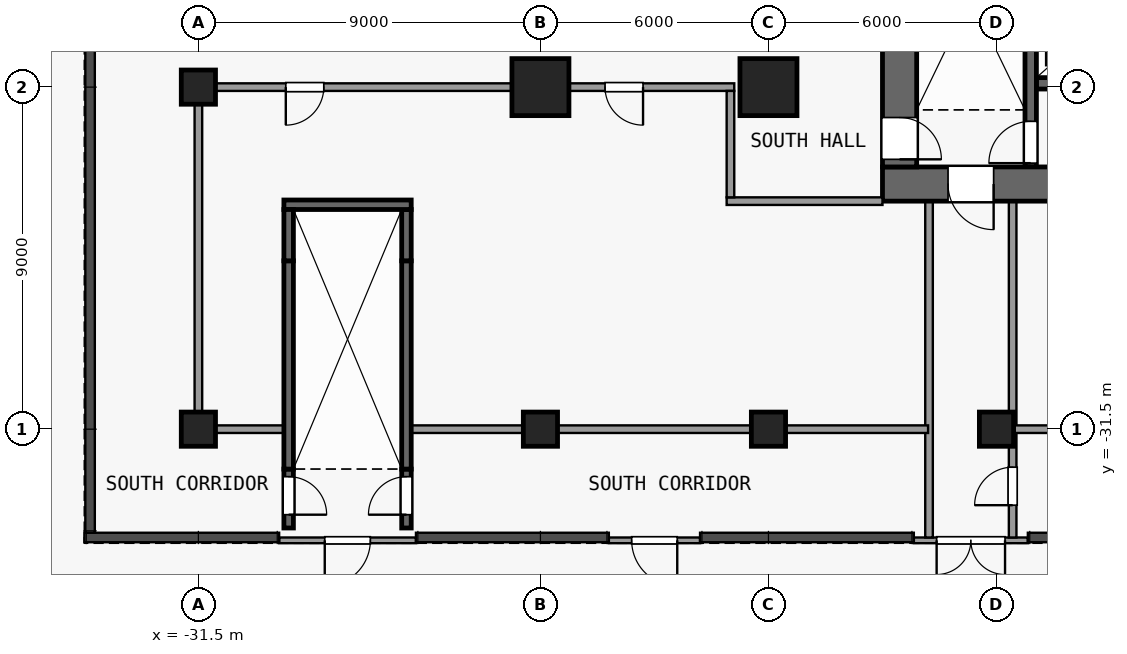
"""IFC4 building model, lengths in metres.
Left out: names, types, materials, properties, quantities, classifications, styles, units other than length and angle.
Written with IfcOpenShell. Run it as: python <this file> out.ifc"""

import sys

from ifc_helpers import new_model, si_unit, direction, frame, frame_2d, origin, origin_2d, place, context, subcontext, project, spatial, rectangle, extrude, element, fill, save


model = new_model("IFC4")
c1 = context("Model", 3, precision=1e-05, world=origin(), true_north=direction((0.0, 1.0)))
c2 = subcontext(c1, "Body", "Model", "MODEL_VIEW")
j1 = project(units=[si_unit("LENGTHUNIT", "METRE"), si_unit("PLANEANGLEUNIT", "RADIAN")], contexts=[c1])
p1 = place(None, origin())
s1 = spatial("IfcSite", under=j1, at=p1, CompositionType="ELEMENT")
p2 = place(p1, origin())
s2 = spatial("IfcBuilding", under=s1, at=p2, CompositionType="ELEMENT")
p3 = place(p2, origin())
s3 = spatial("IfcBuildingStorey", under=s2, at=p3, CompositionType="ELEMENT", Elevation=0.0)
for number, where, z_axis, x_axis in (
    (1, (-31.5, -31.5, 0.0), (0.0, 0.0, 1.0), (1.0, 0.0, 0.0)),
    (2, (-31.5, -22.5, 0.0), (0.0, 0.0, 1.0), (1.0, 0.0, 0.0)),
    (3, (-22.5, -31.5, 0.0), (0.0, 0.0, 1.0), (1.0, 0.0, 0.0)),
):
    element("IfcColumn", number, at=place(p3, frame(where, z_axis=z_axis, x_axis=x_axis)), inside=s3, PredefinedType="COLUMN", context=c2, shape_type="SweptSolid", body=[
        extrude(rectangle(XDim=0.9, YDim=0.9, at=origin_2d()), origin(), (0.0, 0.0, 1.0), 8.0),
    ])
p4 = place(p3, frame((-22.5, -22.5, 0.0), z_axis=(0.0, 0.0, 1.0), x_axis=(1.0, 0.0, 0.0)))
e4 = element("IfcColumn", 4, at=p4, inside=s3, PredefinedType="COLUMN", context=c2, shape_type="SweptSolid", body=[
    extrude(rectangle(XDim=1.5, YDim=1.5, at=origin_2d()), origin(), (0.0, 0.0, 1.0), 8.0),
])
p5 = place(p3, frame((-16.5, -31.5, 0.0), z_axis=(0.0, 0.0, 1.0), x_axis=(1.0, 0.0, 0.0)))
e5 = element("IfcColumn", 5, at=p5, inside=s3, PredefinedType="COLUMN", context=c2, shape_type="SweptSolid", body=[
    extrude(rectangle(XDim=0.9, YDim=0.9, at=origin_2d()), origin(), (0.0, 0.0, 1.0), 8.0),
])
p6 = place(p3, frame((-16.5, -22.5, 0.0), z_axis=(0.0, 0.0, 1.0), x_axis=(1.0, 0.0, 0.0)))
e6 = element("IfcColumn", 6, at=p6, inside=s3, PredefinedType="COLUMN", context=c2, shape_type="SweptSolid", body=[
    extrude(rectangle(XDim=1.5, YDim=1.5, at=origin_2d()), origin(), (0.0, 0.0, 1.0), 8.0),
])
p7 = place(p3, frame((-10.5, -31.5, 0.0), z_axis=(0.0, 0.0, 1.0), x_axis=(1.0, 0.0, 0.0)))
e7 = element("IfcColumn", 7, at=p7, inside=s3, PredefinedType="COLUMN", context=c2, shape_type="SweptSolid", body=[
    extrude(rectangle(XDim=0.9, YDim=0.9, at=origin_2d()), origin(), (0.0, 0.0, 1.0), 8.0),
])
p8 = place(p3, frame((13.5, -25.05, 0.0), z_axis=(0.0, 0.0, 1.0), x_axis=(-1.0, 0.0, 0.0)))
e8 = element("IfcWall", 8, at=p8, inside=s3, PredefinedType="SHEAR", context=c2, shape_type="SweptSolid", body=[
    extrude(rectangle(XDim=27.0, YDim=0.9, at=frame_2d((13.5, 0.0))), origin(), (0.0, 0.0, 1.0), 7.65),
])
p9 = place(p8, frame((24.075, 0.0, 0.0)))
e9 = element("IfcOpeningElement", 9, at=p9, cuts=e8, PredefinedType="OPENING", context=c2, shape_type="SweptSolid", body=[
    extrude(rectangle(XDim=1.2, YDim=2.1, at=frame_2d((0.6, 1.05))), frame((0.0, 0.46, 0.0), z_axis=(0.0, -1.0, 0.0), x_axis=(1.0, 0.0, 0.0)), (0.0, 0.0, 1.0), 0.92),
])
p10 = place(p8, frame((1.725, 0.0, 0.0)))
e10 = element("IfcOpeningElement", 10, at=p10, cuts=e8, PredefinedType="OPENING", context=c2, shape_type="SweptSolid", body=[
    extrude(rectangle(XDim=1.2, YDim=2.1, at=frame_2d((0.6, 1.05))), frame((0.0, 0.46, 0.0), z_axis=(0.0, -1.0, 0.0), x_axis=(1.0, 0.0, 0.0)), (0.0, 0.0, 1.0), 0.92),
])
p11 = place(p3, frame((-13.05, -8.5, 0.0), z_axis=(0.0, 0.0, 1.0), x_axis=(0.0, -1.0, 0.0)))
e11 = element("IfcWall", 11, at=p11, inside=s3, PredefinedType="SHEAR", context=c2, shape_type="SweptSolid", body=[
    extrude(rectangle(XDim=16.1, YDim=0.9, at=frame_2d((8.05, 0.0))), origin(), (0.0, 0.0, 1.0), 7.65),
])
p12 = place(p11, frame((14.8, 0.0, 0.0)))
e12 = element("IfcOpeningElement", 12, at=p12, cuts=e11, PredefinedType="OPENING", context=c2, shape_type="SweptSolid", body=[
    extrude(rectangle(XDim=1.1, YDim=2.1, at=frame_2d((0.55, 1.05))), frame((0.0, 0.46, 0.0), z_axis=(0.0, -1.0, 0.0), x_axis=(1.0, 0.0, 0.0)), (0.0, 0.0, 1.0), 0.92),
])
p13 = place(p3, frame((-9.45, -22.4, 0.0), z_axis=(0.0, 0.0, 1.0), x_axis=(1.0, 0.0, 0.0)))
e13 = element("IfcWall", 13, at=p13, inside=s3, PredefinedType="SHEAR", context=c2, shape_type="SweptSolid", body=[
    extrude(rectangle(XDim=2.8, YDim=0.3, at=frame_2d((1.4, 0.0))), origin(), (0.0, 0.0, 1.0), 7.65),
])
p14 = place(p3, frame((-9.6, -24.6, 0.0), z_axis=(0.0, 0.0, 1.0), x_axis=(0.0, 1.0, 0.0)))
e14 = element("IfcWall", 14, at=p14, inside=s3, PredefinedType="SHEAR", context=c2, shape_type="SweptSolid", body=[
    extrude(rectangle(XDim=7.7, YDim=0.3, at=frame_2d((3.85, 0.0))), origin(), (0.0, 0.0, 1.0), 7.65),
])
p15 = place(p14, frame((0.1, 0.0, 0.0)))
e15 = element("IfcOpeningElement", 15, at=p15, cuts=e14, PredefinedType="OPENING", context=c2, shape_type="SweptSolid", body=[
    extrude(rectangle(XDim=1.1, YDim=2.1, at=frame_2d((0.55, 1.05))), frame((0.0, 0.16, 0.0), z_axis=(0.0, -1.0, 0.0), x_axis=(1.0, 0.0, 0.0)), (0.0, 0.0, 1.0), 0.32),
])
p16 = place(p3, frame((-12.275, -25.5, 0.0), z_axis=(0.0, 0.0, 1.0), x_axis=(0.0, -1.0, 0.0)))
e16 = element("IfcWall", 16, at=p16, inside=s3, PredefinedType="PARTITIONING", context=c2, shape_type="SweptSolid", body=[
    extrude(rectangle(XDim=8.85, YDim=0.2, at=frame_2d((4.425, 0.0))), origin(), (0.0, 0.0, 1.0), 7.65),
])
p17 = place(p3, frame((-10.075, -34.35, 0.0), z_axis=(0.0, 0.0, 1.0), x_axis=(0.0, 1.0, 0.0)))
e17 = element("IfcWall", 17, at=p17, inside=s3, PredefinedType="PARTITIONING", context=c2, shape_type="SweptSolid", body=[
    extrude(rectangle(XDim=8.85, YDim=0.2, at=frame_2d((4.425, 0.0))), origin(), (0.0, 0.0, 1.0), 7.65),
])
p18 = place(p17, frame((0.85, 0.0, 0.0)))
e18 = element("IfcOpeningElement", 18, at=p18, cuts=e17, PredefinedType="OPENING", context=c2, shape_type="SweptSolid", body=[
    extrude(rectangle(XDim=1.0, YDim=2.1, at=frame_2d((0.5, 1.05))), frame((0.0, 0.11, 0.0), z_axis=(0.0, -1.0, 0.0), x_axis=(1.0, 0.0, 0.0)), (0.0, 0.0, 1.0), 0.22),
])
p19 = place(p3, frame((-9.675, -34.425, 0.0), z_axis=(0.0, 0.0, 1.0), x_axis=(-1.0, 0.0, 0.0)))
e19 = element("IfcWall", 19, at=p19, inside=s3, PredefinedType="SOLIDWALL", context=c2, shape_type="SweptSolid", body=[
    extrude(rectangle(XDim=3.0, YDim=0.15, at=frame_2d((1.5, 0.0))), origin(), (0.0, 0.0, 1.0), 7.65),
])
p20 = place(p19, frame((0.6, 0.0, 0.0)))
e20 = element("IfcOpeningElement", 20, at=p20, cuts=e19, PredefinedType="OPENING", context=c2, shape_type="SweptSolid", body=[
    extrude(rectangle(XDim=1.8, YDim=2.1, at=frame_2d((0.9, 1.05))), frame((0.0, 0.085, 0.0), z_axis=(0.0, -1.0, 0.0), x_axis=(1.0, 0.0, 0.0)), (0.0, 0.0, 1.0), 0.17),
])
p21 = place(p3, frame((-25.775, -34.425, 0.0), z_axis=(0.0, 0.0, 1.0), x_axis=(-1.0, 0.0, 0.0)))
e21 = element("IfcWall", 21, at=p21, inside=s3, PredefinedType="SOLIDWALL", context=c2, shape_type="SweptSolid", body=[
    extrude(rectangle(XDim=3.6, YDim=0.15, at=frame_2d((1.8, 0.0))), origin(), (0.0, 0.0, 1.0), 7.65),
])
p22 = place(p21, frame((1.2, 0.0, 0.0)))
e22 = element("IfcOpeningElement", 22, at=p22, cuts=e21, PredefinedType="OPENING", context=c2, shape_type="SweptSolid", body=[
    extrude(rectangle(XDim=1.2, YDim=2.4, at=frame_2d((0.6, 1.2))), frame((0.0, 0.085, 0.0), z_axis=(0.0, -1.0, 0.0), x_axis=(1.0, 0.0, 0.0)), (0.0, 0.0, 1.0), 0.17),
])
p23 = place(p3, frame((-18.3, -34.425, 0.0), z_axis=(0.0, 0.0, 1.0), x_axis=(-1.0, 0.0, 0.0)))
e23 = element("IfcWall", 23, at=p23, inside=s3, PredefinedType="SOLIDWALL", context=c2, shape_type="SweptSolid", body=[
    extrude(rectangle(XDim=2.4, YDim=0.15, at=frame_2d((1.2, 0.0))), origin(), (0.0, 0.0, 1.0), 7.65),
])
p24 = place(p23, frame((0.6, 0.0, 0.0)))
e24 = element("IfcOpeningElement", 24, at=p24, cuts=e23, PredefinedType="OPENING", context=c2, shape_type="SweptSolid", body=[
    extrude(rectangle(XDim=1.2, YDim=2.4, at=frame_2d((0.6, 1.2))), frame((0.0, 0.085, 0.0), z_axis=(0.0, -1.0, 0.0), x_axis=(1.0, 0.0, 0.0)), (0.0, 0.0, 1.0), 0.17),
])
p25 = place(p3, frame((-29.125, -32.55, 0.0), z_axis=(0.0, 0.0, 1.0), x_axis=(0.0, -1.0, 0.0)))
e25 = element("IfcWall", 25, at=p25, inside=s3, PredefinedType="SHEAR", context=c2, shape_type="SweptSolid", body=[
    extrude(rectangle(XDim=1.55, YDim=0.25, at=frame_2d((0.775, 0.0))), origin(), (0.0, 0.0, 1.0), 7.65),
])
p26 = place(p25, frame((0.2, 0.0, 0.0)))
e26 = element("IfcOpeningElement", 26, at=p26, cuts=e25, PredefinedType="OPENING", context=c2, shape_type="SweptSolid", body=[
    extrude(rectangle(XDim=1.0, YDim=2.1, at=frame_2d((0.5, 1.05))), frame((0.0, 0.135, 0.0), z_axis=(0.0, -1.0, 0.0), x_axis=(1.0, 0.0, 0.0)), (0.0, 0.0, 1.0), 0.27),
])
p27 = place(p3, frame((-29.125, -32.55, 0.0), z_axis=(0.0, 0.0, 1.0), x_axis=(0.0, 1.0, 0.0)))
e27 = element("IfcWall", 27, at=p27, inside=s3, PredefinedType="SHEAR", context=c2, shape_type="SweptSolid", body=[
    extrude(rectangle(XDim=5.48, YDim=0.25, at=frame_2d((2.74, 0.0))), origin(), (0.0, 0.0, 1.0), 7.65),
])
p28 = place(p3, frame((-29.125, -27.07, 0.0), z_axis=(0.0, 0.0, 1.0), x_axis=(0.0, 1.0, 0.0)))
e28 = element("IfcWall", 28, at=p28, inside=s3, PredefinedType="SHEAR", context=c2, shape_type="SweptSolid", body=[
    extrude(rectangle(XDim=1.35, YDim=0.25, at=frame_2d((0.675, 0.0))), origin(), (0.0, 0.0, 1.0), 7.65),
])
p29 = place(p3, frame((-26.025, -34.1, 0.0), z_axis=(0.0, 0.0, 1.0), x_axis=(0.0, 1.0, 0.0)))
e29 = element("IfcWall", 29, at=p29, inside=s3, PredefinedType="SHEAR", context=c2, shape_type="SweptSolid", body=[
    extrude(rectangle(XDim=1.55, YDim=0.25, at=frame_2d((0.775, 0.0))), origin(), (0.0, 0.0, 1.0), 7.65),
])
p30 = place(p29, frame((0.35, 0.0, 0.0)))
e30 = element("IfcOpeningElement", 30, at=p30, cuts=e29, PredefinedType="OPENING", context=c2, shape_type="SweptSolid", body=[
    extrude(rectangle(XDim=1.0, YDim=2.1, at=frame_2d((0.5, 1.05))), frame((0.0, 0.135, 0.0), z_axis=(0.0, -1.0, 0.0), x_axis=(1.0, 0.0, 0.0)), (0.0, 0.0, 1.0), 0.27),
])
p31 = place(p3, frame((-26.025, -32.55, 0.0), z_axis=(0.0, 0.0, 1.0), x_axis=(0.0, 1.0, 0.0)))
e31 = element("IfcWall", 31, at=p31, inside=s3, PredefinedType="SHEAR", context=c2, shape_type="SweptSolid", body=[
    extrude(rectangle(XDim=5.48, YDim=0.25, at=frame_2d((2.74, 0.0))), origin(), (0.0, 0.0, 1.0), 7.65),
])
p32 = place(p3, frame((-26.025, -27.07, 0.0), z_axis=(0.0, 0.0, 1.0), x_axis=(0.0, 1.0, 0.0)))
e32 = element("IfcWall", 32, at=p32, inside=s3, PredefinedType="SHEAR", context=c2, shape_type="SweptSolid", body=[
    extrude(rectangle(XDim=1.35, YDim=0.25, at=frame_2d((0.675, 0.0))), origin(), (0.0, 0.0, 1.0), 7.65),
])
p33 = place(p3, frame((-29.25, -25.595, 0.0), z_axis=(0.0, 0.0, 1.0), x_axis=(1.0, 0.0, 0.0)))
e33 = element("IfcWall", 33, at=p33, inside=s3, PredefinedType="SHEAR", context=c2, shape_type="SweptSolid", body=[
    extrude(rectangle(XDim=3.35, YDim=0.25, at=frame_2d((1.675, 0.0))), origin(), (0.0, 0.0, 1.0), 7.65),
])
p34 = place(p3, frame((-31.6, -31.5, 0.0), z_axis=(0.0, 0.0, 1.0), x_axis=(1.0, 0.0, 0.0)))
e34 = element("IfcWall", 34, at=p34, inside=s3, PredefinedType="PARTITIONING", context=c2, shape_type="SweptSolid", body=[
    extrude(rectangle(XDim=2.35, YDim=0.2, at=frame_2d((1.175, 0.0))), origin(), (0.0, 0.0, 1.0), 7.65),
])
p35 = place(p3, frame((-25.9, -31.5, 0.0), z_axis=(0.0, 0.0, 1.0), x_axis=(1.0, 0.0, 0.0)))
e35 = element("IfcWall", 35, at=p35, inside=s3, PredefinedType="PARTITIONING", context=c2, shape_type="SweptSolid", body=[
    extrude(rectangle(XDim=13.6, YDim=0.2, at=frame_2d((6.8, 0.0))), origin(), (0.0, 0.0, 1.0), 7.65),
])
p36 = place(p3, frame((-10.05, -31.5, 0.0), z_axis=(0.0, 0.0, 1.0), x_axis=(1.0, 0.0, 0.0)))
e36 = element("IfcWall", 36, at=p36, inside=s3, PredefinedType="PARTITIONING", context=c2, shape_type="SweptSolid", body=[
    extrude(rectangle(XDim=20.1, YDim=0.2, at=frame_2d((10.05, 0.0))), origin(), (0.0, 0.0, 1.0), 7.65),
])
p37 = place(p36, frame((3.5, 0.0, 0.0)))
e37 = element("IfcOpeningElement", 37, at=p37, cuts=e36, PredefinedType="OPENING", context=c2, shape_type="SweptSolid", body=[
    extrude(rectangle(XDim=1.0, YDim=2.1, at=frame_2d((0.5, 1.05))), frame((0.0, 0.11, 0.0), z_axis=(0.0, -1.0, 0.0), x_axis=(1.0, 0.0, 0.0)), (0.0, 0.0, 1.0), 0.22),
])
p38 = place(p36, frame((15.6, 0.0, 0.0)))
e38 = element("IfcOpeningElement", 38, at=p38, cuts=e36, PredefinedType="OPENING", context=c2, shape_type="SweptSolid", body=[
    extrude(rectangle(XDim=1.0, YDim=2.1, at=frame_2d((0.5, 1.05))), frame((0.0, 0.11, 0.0), z_axis=(0.0, -1.0, 0.0), x_axis=(1.0, 0.0, 0.0)), (0.0, 0.0, 1.0), 0.22),
])
p39 = place(p3, frame((-17.6, -25.5, 0.0), z_axis=(0.0, 0.0, 1.0), x_axis=(1.0, 0.0, 0.0)))
e39 = element("IfcWall", 39, at=p39, inside=s3, PredefinedType="PARTITIONING", context=c2, shape_type="SweptSolid", body=[
    extrude(rectangle(XDim=4.1, YDim=0.2, at=frame_2d((2.05, 0.0))), origin(), (0.0, 0.0, 1.0), 7.65),
])
p40 = place(p3, frame((-31.6, -22.5, 0.0), z_axis=(0.0, 0.0, 1.0), x_axis=(1.0, 0.0, 0.0)))
e40 = element("IfcWall", 40, at=p40, inside=s3, PredefinedType="PARTITIONING", context=c2, shape_type="SweptSolid", body=[
    extrude(rectangle(XDim=14.2, YDim=0.2, at=frame_2d((7.1, 0.0))), origin(), (0.0, 0.0, 1.0), 7.65),
])
p41 = place(p40, frame((2.4, 0.0, 0.0)))
e41 = element("IfcOpeningElement", 41, at=p41, cuts=e40, PredefinedType="OPENING", context=c2, shape_type="SweptSolid", body=[
    extrude(rectangle(XDim=1.0, YDim=2.1, at=frame_2d((0.5, 1.05))), frame((0.0, 0.11, 0.0), z_axis=(0.0, -1.0, 0.0), x_axis=(1.0, 0.0, 0.0)), (0.0, 0.0, 1.0), 0.22),
])
p42 = place(p40, frame((10.8, 0.0, 0.0)))
e42 = element("IfcOpeningElement", 42, at=p42, cuts=e40, PredefinedType="OPENING", context=c2, shape_type="SweptSolid", body=[
    extrude(rectangle(XDim=1.0, YDim=2.1, at=frame_2d((0.5, 1.05))), frame((0.0, 0.11, 0.0), z_axis=(0.0, -1.0, 0.0), x_axis=(1.0, 0.0, 0.0)), (0.0, 0.0, 1.0), 0.22),
])
p43 = place(p3, frame((-31.5, -31.4, 0.0), z_axis=(0.0, 0.0, 1.0), x_axis=(0.0, 1.0, 0.0)))
e43 = element("IfcWall", 43, at=p43, inside=s3, PredefinedType="PARTITIONING", context=c2, shape_type="SweptSolid", body=[
    extrude(rectangle(XDim=8.8, YDim=0.2, at=frame_2d((4.4, 0.0))), origin(), (0.0, 0.0, 1.0), 7.65),
])
p44 = place(p3, frame((-17.5, -25.4, 0.0), z_axis=(0.0, 0.0, 1.0), x_axis=(0.0, 1.0, 0.0)))
e44 = element("IfcWall", 44, at=p44, inside=s3, PredefinedType="PARTITIONING", context=c2, shape_type="SweptSolid", body=[
    extrude(rectangle(XDim=2.8, YDim=0.2, at=frame_2d((1.4, 0.0))), origin(), (0.0, 0.0, 1.0), 7.65),
])
p45 = place(p9, origin())
e45 = element("IfcDoor", 45, at=p45, inside=s3, OperationType="SINGLE_SWING_LEFT", PredefinedType="DOOR", context=c2, shape_type="SweptSolid", body=[
    extrude(rectangle(XDim=1.2, YDim=2.1, at=frame_2d((0.6, 1.05))), frame((0.0, 0.025, 0.0), z_axis=(0.0, -1.0, 0.0), x_axis=(1.0, 0.0, 0.0)), (0.0, 0.0, 1.0), 0.05),
])
fill(e9, e45)
p46 = place(p15, origin())
e46 = element("IfcDoor", 46, at=p46, inside=s3, OperationType="SINGLE_SWING_LEFT", PredefinedType="DOOR", context=c2, shape_type="SweptSolid", body=[
    extrude(rectangle(XDim=1.1, YDim=2.1, at=frame_2d((0.55, 1.05))), frame((0.0, 0.025, 0.0), z_axis=(0.0, -1.0, 0.0), x_axis=(1.0, 0.0, 0.0)), (0.0, 0.0, 1.0), 0.05),
])
fill(e15, e46)
p47 = place(p12, origin())
e47 = element("IfcDoor", 47, at=p47, inside=s3, OperationType="SINGLE_SWING_RIGHT", PredefinedType="DOOR", context=c2, shape_type="SweptSolid", body=[
    extrude(rectangle(XDim=1.1, YDim=2.1, at=frame_2d((0.55, 1.05))), frame((0.0, 0.025, 0.0), z_axis=(0.0, -1.0, 0.0), x_axis=(1.0, 0.0, 0.0)), (0.0, 0.0, 1.0), 0.05),
])
fill(e12, e47)
p48 = place(p18, origin())
e48 = element("IfcDoor", 48, at=p48, inside=s3, OperationType="SINGLE_SWING_LEFT", PredefinedType="DOOR", context=c2, shape_type="SweptSolid", body=[
    extrude(rectangle(XDim=1.0, YDim=2.1, at=frame_2d((0.5, 1.05))), frame((0.0, 0.025, 0.0), z_axis=(0.0, -1.0, 0.0), x_axis=(1.0, 0.0, 0.0)), (0.0, 0.0, 1.0), 0.05),
])
fill(e18, e48)
p49 = place(p20, origin())
e49 = element("IfcDoor", 49, at=p49, inside=s3, OperationType="DOUBLE_DOOR_SINGLE_SWING", PredefinedType="DOOR", context=c2, shape_type="SweptSolid", body=[
    extrude(rectangle(XDim=1.8, YDim=2.1, at=frame_2d((0.9, 1.05))), frame((0.0, 0.025, 0.0), z_axis=(0.0, -1.0, 0.0), x_axis=(1.0, 0.0, 0.0)), (0.0, 0.0, 1.0), 0.05),
])
fill(e20, e49)
p50 = place(p22, origin())
e50 = element("IfcDoor", 50, at=p50, inside=s3, OperationType="SINGLE_SWING_RIGHT", PredefinedType="DOOR", context=c2, shape_type="SweptSolid", body=[
    extrude(rectangle(XDim=1.2, YDim=2.4, at=frame_2d((0.6, 1.2))), frame((0.0, 0.025, 0.0), z_axis=(0.0, -1.0, 0.0), x_axis=(1.0, 0.0, 0.0)), (0.0, 0.0, 1.0), 0.05),
])
fill(e22, e50)
p51 = place(p24, origin())
e51 = element("IfcDoor", 51, at=p51, inside=s3, OperationType="SINGLE_SWING_LEFT", PredefinedType="DOOR", context=c2, shape_type="SweptSolid", body=[
    extrude(rectangle(XDim=1.2, YDim=2.4, at=frame_2d((0.6, 1.2))), frame((0.0, 0.025, 0.0), z_axis=(0.0, -1.0, 0.0), x_axis=(1.0, 0.0, 0.0)), (0.0, 0.0, 1.0), 0.05),
])
fill(e24, e51)
p52 = place(p26, origin())
e52 = element("IfcDoor", 52, at=p52, inside=s3, OperationType="SINGLE_SWING_RIGHT", PredefinedType="DOOR", context=c2, shape_type="SweptSolid", body=[
    extrude(rectangle(XDim=1.0, YDim=2.1, at=frame_2d((0.5, 1.05))), frame((0.0, 0.025, 0.0), z_axis=(0.0, -1.0, 0.0), x_axis=(1.0, 0.0, 0.0)), (0.0, 0.0, 1.0), 0.05),
])
fill(e26, e52)
p53 = place(p30, origin())
e53 = element("IfcDoor", 53, at=p53, inside=s3, OperationType="SINGLE_SWING_LEFT", PredefinedType="DOOR", context=c2, shape_type="SweptSolid", body=[
    extrude(rectangle(XDim=1.0, YDim=2.1, at=frame_2d((0.5, 1.05))), frame((0.0, 0.025, 0.0), z_axis=(0.0, -1.0, 0.0), x_axis=(1.0, 0.0, 0.0)), (0.0, 0.0, 1.0), 0.05),
])
fill(e30, e53)
p54 = place(p41, origin())
e54 = element("IfcDoor", 54, at=p54, inside=s3, OperationType="SINGLE_SWING_LEFT", PredefinedType="DOOR", context=c2, shape_type="SweptSolid", body=[
    extrude(rectangle(XDim=1.0, YDim=2.1, at=frame_2d((0.5, 1.05))), frame((0.0, 0.025, 0.0), z_axis=(0.0, -1.0, 0.0), x_axis=(1.0, 0.0, 0.0)), (0.0, 0.0, 1.0), 0.05),
])
fill(e41, e54)
p55 = place(p42, origin())
e55 = element("IfcDoor", 55, at=p55, inside=s3, OperationType="SINGLE_SWING_RIGHT", PredefinedType="DOOR", context=c2, shape_type="SweptSolid", body=[
    extrude(rectangle(XDim=1.0, YDim=2.1, at=frame_2d((0.5, 1.05))), frame((0.0, 0.025, 0.0), z_axis=(0.0, -1.0, 0.0), x_axis=(1.0, 0.0, 0.0)), (0.0, 0.0, 1.0), 0.05),
])
fill(e42, e55)
save(model, sys.argv[1])
